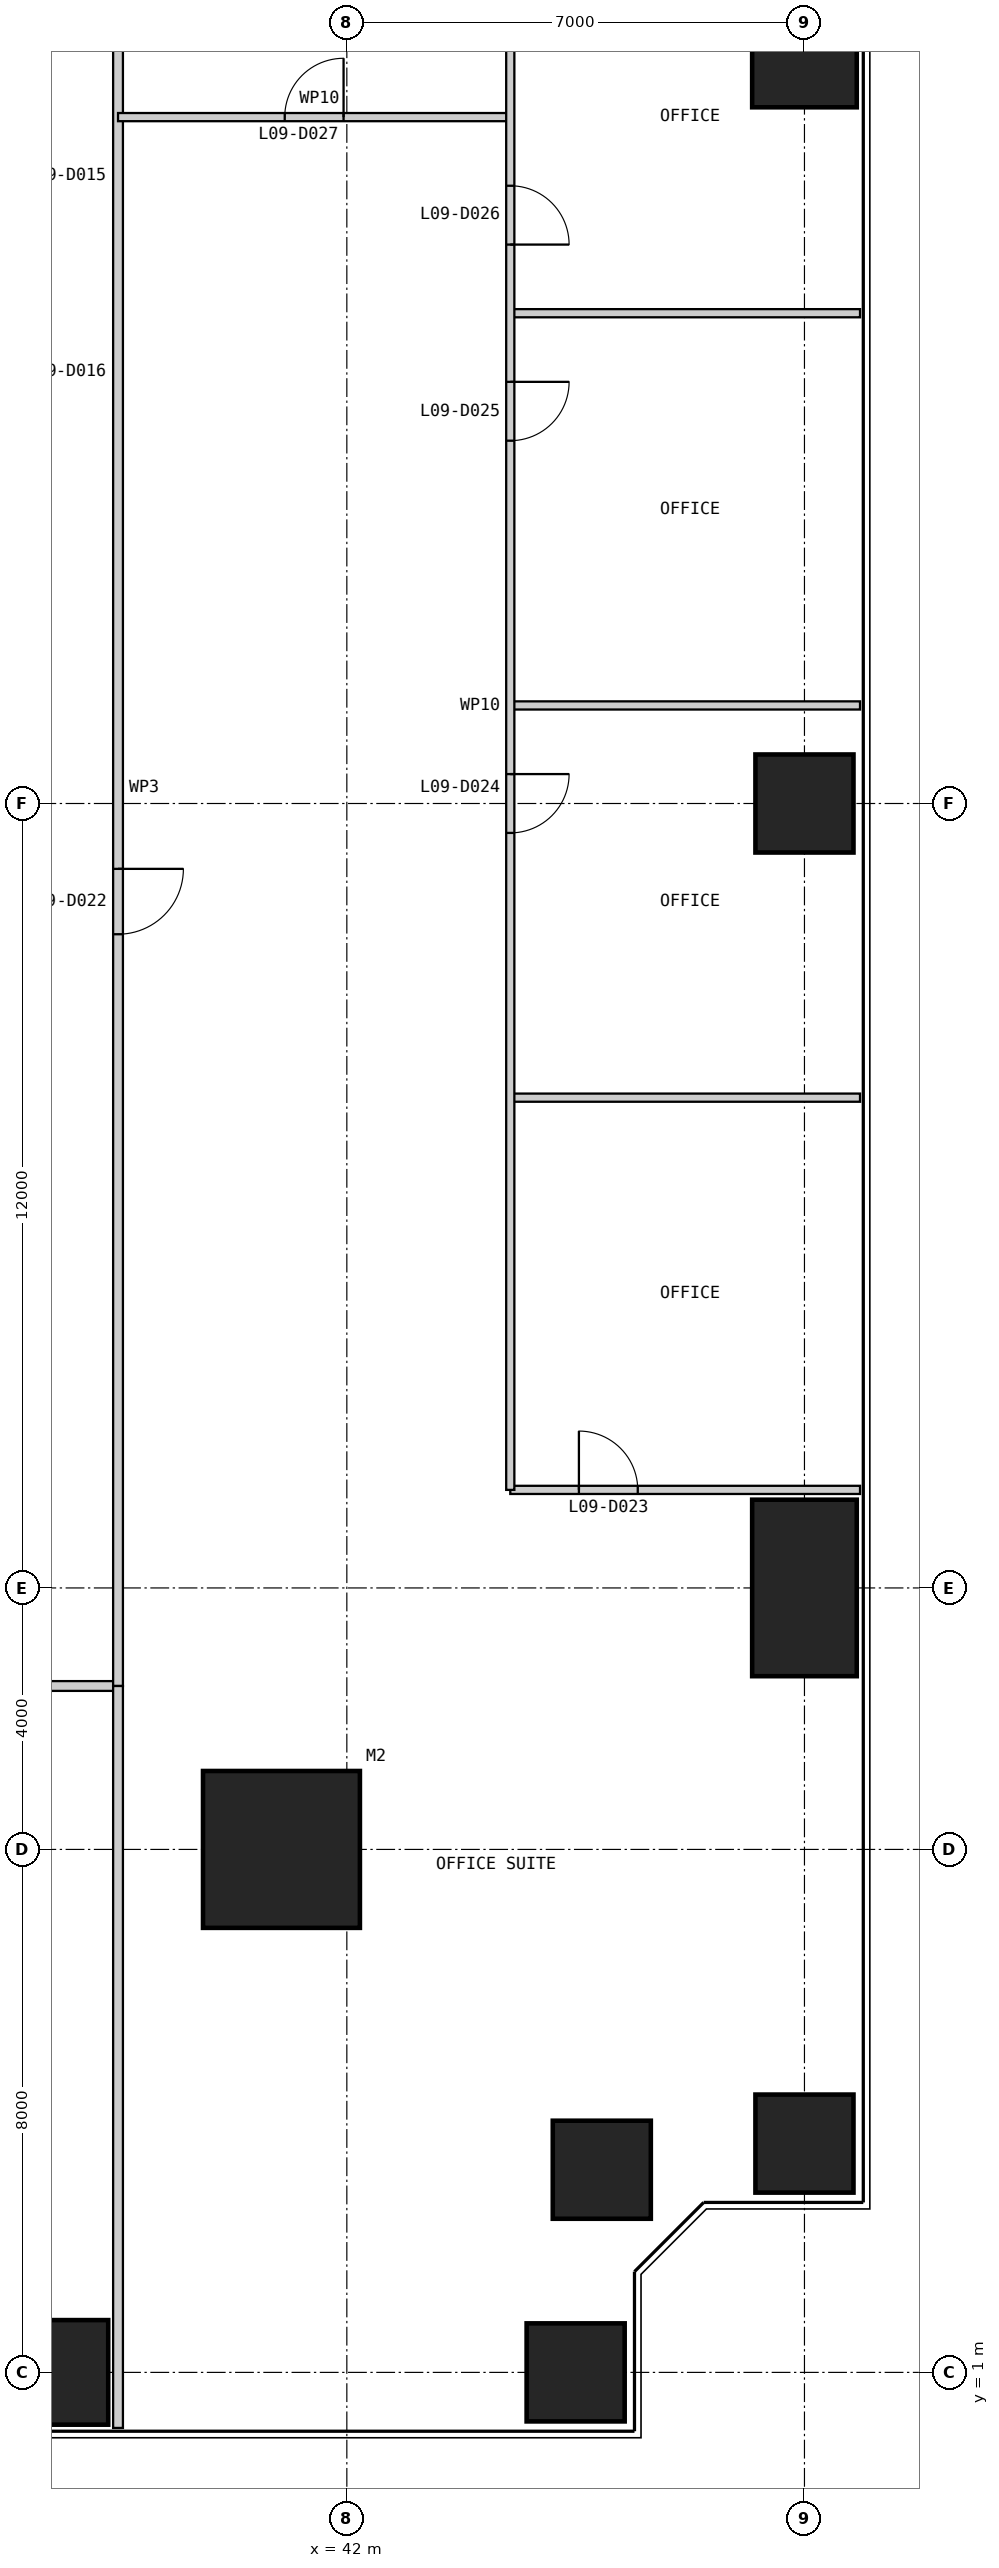
"""IFC4 building model, lengths in metres.
Left out: names, types, materials, properties, quantities, classifications, styles, units other than length and angle.
Written with IfcOpenShell. Run it as: python <this file> out.ifc"""

import sys

from ifc_helpers import new_model, si_unit, direction, frame, frame_2d, origin, origin_2d, place, context, subcontext, project, spatial, rectangle, extrude, element, fill, save


model = new_model("IFC4")
c1 = context("Model", 3, precision=1e-05, world=origin(), true_north=direction((0.0, 1.0)))
c2 = subcontext(c1, "Body", "Model", "MODEL_VIEW")
j1 = project(units=[si_unit("LENGTHUNIT", "METRE"), si_unit("PLANEANGLEUNIT", "RADIAN")], contexts=[c1])
p1 = place(None, origin())
s1 = spatial("IfcSite", under=j1, at=p1, CompositionType="ELEMENT")
p2 = place(p1, origin())
s2 = spatial("IfcBuilding", under=s1, at=p2, CompositionType="ELEMENT")
p3 = place(p2, frame((0.0, 0.0, 43.0)))
s3 = spatial("IfcBuildingStorey", under=s2, at=p3, CompositionType="ELEMENT", Elevation=43.0)
p4 = place(p3, frame((41.0, 9.0, 0.0), z_axis=(0.0, 0.0, 1.0), x_axis=(1.0, 0.0, 0.0)))
e1 = element("IfcColumn", 1, at=p4, inside=s3, PredefinedType="COLUMN", context=c2, shape_type="SweptSolid", body=[
    extrude(rectangle(XDim=2.4, YDim=2.4, at=origin_2d()), origin(), (0.0, 0.0, 1.0), 4.0),
])
p5 = place(p3, frame((37.0, 1.0, 0.0), z_axis=(0.0, 0.0, 1.0), x_axis=(1.0, 0.0, 0.0)))
e2 = element("IfcColumn", 2, at=p5, inside=s3, PredefinedType="COLUMN", context=c2, shape_type="SweptSolid", body=[
    extrude(rectangle(XDim=2.7, YDim=1.6, at=origin_2d()), origin(), (0.0, 0.0, 1.0), 4.0),
])
for number, where, z_axis, x_axis in (
    (3, (45.5, 1.0, 0.0), (0.0, 0.0, 1.0), (1.0, 0.0, 0.0)),
    (4, (45.9, 4.1, 0.0), (0.0, 0.0, 1.0), (1.0, 0.0, 0.0)),
    (5, (49.0, 4.5, 0.0), (0.0, 0.0, 1.0), (1.0, 0.0, 0.0)),
):
    element("IfcColumn", number, at=place(p3, frame(where, z_axis=z_axis, x_axis=x_axis)), inside=s3, PredefinedType="COLUMN", context=c2, shape_type="SweptSolid", body=[
        extrude(rectangle(XDim=1.5, YDim=1.5, at=origin_2d()), origin(), (0.0, 0.0, 1.0), 4.0),
    ])
p6 = place(p3, frame((49.0, 13.0, 0.0), z_axis=(0.0, 0.0, 1.0), x_axis=(1.0, 0.0, 0.0)))
e6 = element("IfcColumn", 6, at=p6, inside=s3, PredefinedType="COLUMN", context=c2, shape_type="SweptSolid", body=[
    extrude(rectangle(XDim=1.6, YDim=2.7, at=origin_2d()), origin(), (0.0, 0.0, 1.0), 4.0),
])
p7 = place(p3, frame((49.0, 25.0, 0.0), z_axis=(0.0, 0.0, 1.0), x_axis=(1.0, 0.0, 0.0)))
e7 = element("IfcColumn", 7, at=p7, inside=s3, PredefinedType="COLUMN", context=c2, shape_type="SweptSolid", body=[
    extrude(rectangle(XDim=1.5, YDim=1.5, at=origin_2d()), origin(), (0.0, 0.0, 1.0), 4.0),
])
p8 = place(p3, frame((49.0, 37.0, 0.0), z_axis=(0.0, 0.0, 1.0), x_axis=(1.0, 0.0, 0.0)))
e8 = element("IfcColumn", 8, at=p8, inside=s3, PredefinedType="COLUMN", context=c2, shape_type="SweptSolid", body=[
    extrude(rectangle(XDim=1.6, YDim=2.7, at=origin_2d()), origin(), (0.0, 0.0, 1.0), 4.0),
])
p9 = place(p3, frame((11.5, 11.5, 0.0), z_axis=(0.0, 0.0, 1.0), x_axis=(1.0, 0.0, 0.0)))
e9 = element("IfcWall", 9, at=p9, inside=s3, PredefinedType="PARTITIONING", context=c2, shape_type="SweptSolid", body=[
    extrude(rectangle(XDim=27.0, YDim=0.15, at=frame_2d((13.5, 0.0))), origin(), (0.0, 0.0, 1.0), 3.85),
])
p10 = place(p9, frame((4.0, 0.0, 0.0)))
e10 = element("IfcOpeningElement", 10, at=p10, cuts=e9, PredefinedType="OPENING", context=c2, shape_type="SweptSolid", body=[
    extrude(rectangle(XDim=1.0, YDim=2.2, at=frame_2d((0.5, 1.1))), frame((0.0, 0.085, 0.0), z_axis=(0.0, -1.0, 0.0), x_axis=(1.0, 0.0, 0.0)), (0.0, 0.0, 1.0), 0.17),
])
p11 = place(p9, frame((10.0, 0.0, 0.0)))
e11 = element("IfcOpeningElement", 11, at=p11, cuts=e9, PredefinedType="OPENING", context=c2, shape_type="SweptSolid", body=[
    extrude(rectangle(XDim=1.0, YDim=2.2, at=frame_2d((0.5, 1.1))), frame((0.0, 0.085, 0.0), z_axis=(0.0, -1.0, 0.0), x_axis=(1.0, 0.0, 0.0)), (0.0, 0.0, 1.0), 0.17),
])
p12 = place(p9, frame((17.5, 0.0, 0.0)))
e12 = element("IfcOpeningElement", 12, at=p12, cuts=e9, PredefinedType="OPENING", context=c2, shape_type="SweptSolid", body=[
    extrude(rectangle(XDim=1.0, YDim=2.2, at=frame_2d((0.5, 1.1))), frame((0.0, 0.085, 0.0), z_axis=(0.0, -1.0, 0.0), x_axis=(1.0, 0.0, 0.0)), (0.0, 0.0, 1.0), 0.17),
])
p13 = place(p9, frame((23.5, 0.0, 0.0)))
e13 = element("IfcOpeningElement", 13, at=p13, cuts=e9, PredefinedType="OPENING", context=c2, shape_type="SweptSolid", body=[
    extrude(rectangle(XDim=1.0, YDim=2.2, at=frame_2d((0.5, 1.1))), frame((0.0, 0.085, 0.0), z_axis=(0.0, -1.0, 0.0), x_axis=(1.0, 0.0, 0.0)), (0.0, 0.0, 1.0), 0.17),
])
p14 = place(p3, frame((38.5, 11.5, 0.0), z_axis=(0.0, 0.0, 1.0), x_axis=(0.0, 1.0, 0.0)))
e14 = element("IfcWall", 14, at=p14, inside=s3, PredefinedType="PARTITIONING", context=c2, shape_type="SweptSolid", body=[
    extrude(rectangle(XDim=27.0, YDim=0.15, at=frame_2d((13.5, 0.0))), origin(), (0.0, 0.0, 1.0), 3.85),
])
p15 = place(p14, frame((11.5, 0.0, 0.0)))
e15 = element("IfcOpeningElement", 15, at=p15, cuts=e14, PredefinedType="OPENING", context=c2, shape_type="SweptSolid", body=[
    extrude(rectangle(XDim=1.0, YDim=2.2, at=frame_2d((0.5, 1.1))), frame((0.0, 0.085, 0.0), z_axis=(0.0, -1.0, 0.0), x_axis=(1.0, 0.0, 0.0)), (0.0, 0.0, 1.0), 0.17),
])
p16 = place(p3, frame((38.5, 0.15, 0.0), z_axis=(0.0, 0.0, 1.0), x_axis=(0.0, 1.0, 0.0)))
e16 = element("IfcWall", 16, at=p16, inside=s3, PredefinedType="PARTITIONING", context=c2, shape_type="SweptSolid", body=[
    extrude(rectangle(XDim=11.35, YDim=0.15, at=frame_2d((5.675, 0.0))), origin(), (0.0, 0.0, 1.0), 3.85),
])
p17 = place(p3, frame((49.85, 14.5, 0.0), z_axis=(0.0, 0.0, 1.0), x_axis=(-1.0, 0.0, 0.0)))
e17 = element("IfcWall", 17, at=p17, inside=s3, PredefinedType="PARTITIONING", context=c2, shape_type="SweptSolid", body=[
    extrude(rectangle(XDim=5.35, YDim=0.125, at=frame_2d((2.675, 0.0))), origin(), (0.0, 0.0, 1.0), 3.85),
])
p18 = place(p17, frame((3.4, 0.0, 0.0)))
e18 = element("IfcOpeningElement", 18, at=p18, cuts=e17, PredefinedType="OPENING", context=c2, shape_type="SweptSolid", body=[
    extrude(rectangle(XDim=0.9, YDim=2.2, at=frame_2d((0.45, 1.1))), frame((0.0, 0.073, 0.0), z_axis=(0.0, -1.0, 0.0), x_axis=(1.0, 0.0, 0.0)), (0.0, 0.0, 1.0), 0.145),
])
for number, where, z_axis, x_axis in (
    (19, (49.85, 20.5, 0.0), (0.0, 0.0, 1.0), (-1.0, 0.0, 0.0)),
    (20, (49.85, 26.5, 0.0), (0.0, 0.0, 1.0), (-1.0, 0.0, 0.0)),
    (21, (49.85, 32.5, 0.0), (0.0, 0.0, 1.0), (-1.0, 0.0, 0.0)),
):
    element("IfcWall", number, at=place(p3, frame(where, z_axis=z_axis, x_axis=x_axis)), inside=s3, PredefinedType="PARTITIONING", context=c2, shape_type="SweptSolid", body=[
        extrude(rectangle(XDim=5.35, YDim=0.125, at=frame_2d((2.675, 0.0))), origin(), (0.0, 0.0, 1.0), 3.85),
    ])
p19 = place(p3, frame((44.5, 35.5, 0.0), z_axis=(0.0, 0.0, 1.0), x_axis=(-1.0, 0.0, 0.0)))
e22 = element("IfcWall", 22, at=p19, inside=s3, PredefinedType="PARTITIONING", context=c2, shape_type="SweptSolid", body=[
    extrude(rectangle(XDim=6.0, YDim=0.125, at=frame_2d((3.0, 0.0))), origin(), (0.0, 0.0, 1.0), 3.85),
])
p20 = place(p19, frame((2.55, 0.0, 0.0)))
e23 = element("IfcOpeningElement", 23, at=p20, cuts=e22, PredefinedType="OPENING", context=c2, shape_type="SweptSolid", body=[
    extrude(rectangle(XDim=0.9, YDim=2.2, at=frame_2d((0.45, 1.1))), frame((0.0, 0.073, 0.0), z_axis=(0.0, -1.0, 0.0), x_axis=(1.0, 0.0, 0.0)), (0.0, 0.0, 1.0), 0.145),
])
p21 = place(p3, frame((44.5, 14.5, 0.0), z_axis=(0.0, 0.0, 1.0), x_axis=(0.0, 1.0, 0.0)))
e24 = element("IfcWall", 24, at=p21, inside=s3, PredefinedType="PARTITIONING", context=c2, shape_type="SweptSolid", body=[
    extrude(rectangle(XDim=24.0, YDim=0.125, at=frame_2d((12.0, 0.0))), origin(), (0.0, 0.0, 1.0), 3.85),
])
p22 = place(p21, frame((10.05, 0.0, 0.0)))
e25 = element("IfcOpeningElement", 25, at=p22, cuts=e24, PredefinedType="OPENING", context=c2, shape_type="SweptSolid", body=[
    extrude(rectangle(XDim=0.9, YDim=2.2, at=frame_2d((0.45, 1.1))), frame((0.0, 0.073, 0.0), z_axis=(0.0, -1.0, 0.0), x_axis=(1.0, 0.0, 0.0)), (0.0, 0.0, 1.0), 0.145),
])
p23 = place(p21, frame((16.05, 0.0, 0.0)))
e26 = element("IfcOpeningElement", 26, at=p23, cuts=e24, PredefinedType="OPENING", context=c2, shape_type="SweptSolid", body=[
    extrude(rectangle(XDim=0.9, YDim=2.2, at=frame_2d((0.45, 1.1))), frame((0.0, 0.073, 0.0), z_axis=(0.0, -1.0, 0.0), x_axis=(1.0, 0.0, 0.0)), (0.0, 0.0, 1.0), 0.145),
])
p24 = place(p21, frame((19.05, 0.0, 0.0)))
e27 = element("IfcOpeningElement", 27, at=p24, cuts=e24, PredefinedType="OPENING", context=c2, shape_type="SweptSolid", body=[
    extrude(rectangle(XDim=0.9, YDim=2.2, at=frame_2d((0.45, 1.1))), frame((0.0, 0.073, 0.0), z_axis=(0.0, -1.0, 0.0), x_axis=(1.0, 0.0, 0.0)), (0.0, 0.0, 1.0), 0.145),
])
p25 = place(p15, frame((1.0, 0.0, 0.0), z_axis=(0.0, 0.0, 1.0), x_axis=(-1.0, 0.0, 0.0)))
e28 = element("IfcDoor", 28, at=p25, inside=s3, OperationType="SINGLE_SWING_LEFT", PredefinedType="DOOR", context=c2, shape_type="SweptSolid", body=[
    extrude(rectangle(XDim=1.0, YDim=2.2, at=frame_2d((0.5, 1.1))), frame((0.0, 0.025, 0.0), z_axis=(0.0, -1.0, 0.0), x_axis=(1.0, 0.0, 0.0)), (0.0, 0.0, 1.0), 0.05),
])
fill(e15, e28)
p26 = place(p18, frame((0.9, 0.0, 0.0), z_axis=(0.0, 0.0, 1.0), x_axis=(-1.0, 0.0, 0.0)))
e29 = element("IfcDoor", 29, at=p26, inside=s3, OperationType="SINGLE_SWING_LEFT", PredefinedType="DOOR", context=c2, shape_type="SweptSolid", body=[
    extrude(rectangle(XDim=0.9, YDim=2.2, at=frame_2d((0.45, 1.1))), frame((0.0, 0.025, 0.0), z_axis=(0.0, -1.0, 0.0), x_axis=(1.0, 0.0, 0.0)), (0.0, 0.0, 1.0), 0.05),
])
fill(e18, e29)
p27 = place(p22, frame((0.9, 0.0, 0.0), z_axis=(0.0, 0.0, 1.0), x_axis=(-1.0, 0.0, 0.0)))
e30 = element("IfcDoor", 30, at=p27, inside=s3, OperationType="SINGLE_SWING_LEFT", PredefinedType="DOOR", context=c2, shape_type="SweptSolid", body=[
    extrude(rectangle(XDim=0.9, YDim=2.2, at=frame_2d((0.45, 1.1))), frame((0.0, 0.025, 0.0), z_axis=(0.0, -1.0, 0.0), x_axis=(1.0, 0.0, 0.0)), (0.0, 0.0, 1.0), 0.05),
])
fill(e25, e30)
p28 = place(p23, frame((0.9, 0.0, 0.0), z_axis=(0.0, 0.0, 1.0), x_axis=(-1.0, 0.0, 0.0)))
e31 = element("IfcDoor", 31, at=p28, inside=s3, OperationType="SINGLE_SWING_LEFT", PredefinedType="DOOR", context=c2, shape_type="SweptSolid", body=[
    extrude(rectangle(XDim=0.9, YDim=2.2, at=frame_2d((0.45, 1.1))), frame((0.0, 0.025, 0.0), z_axis=(0.0, -1.0, 0.0), x_axis=(1.0, 0.0, 0.0)), (0.0, 0.0, 1.0), 0.05),
])
fill(e26, e31)
p29 = place(p24, frame((0.9, 0.0, 0.0), z_axis=(0.0, 0.0, 1.0), x_axis=(-1.0, 0.0, 0.0)))
e32 = element("IfcDoor", 32, at=p29, inside=s3, OperationType="SINGLE_SWING_RIGHT", PredefinedType="DOOR", context=c2, shape_type="SweptSolid", body=[
    extrude(rectangle(XDim=0.9, YDim=2.2, at=frame_2d((0.45, 1.1))), frame((0.0, 0.025, 0.0), z_axis=(0.0, -1.0, 0.0), x_axis=(1.0, 0.0, 0.0)), (0.0, 0.0, 1.0), 0.05),
])
fill(e27, e32)
p30 = place(p20, frame((0.9, 0.0, 0.0), z_axis=(0.0, 0.0, 1.0), x_axis=(-1.0, 0.0, 0.0)))
e33 = element("IfcDoor", 33, at=p30, inside=s3, OperationType="SINGLE_SWING_RIGHT", PredefinedType="DOOR", context=c2, shape_type="SweptSolid", body=[
    extrude(rectangle(XDim=0.9, YDim=2.2, at=frame_2d((0.45, 1.1))), frame((0.0, 0.025, 0.0), z_axis=(0.0, -1.0, 0.0), x_axis=(1.0, 0.0, 0.0)), (0.0, 0.0, 1.0), 0.05),
])
fill(e23, e33)
save(model, sys.argv[1])
